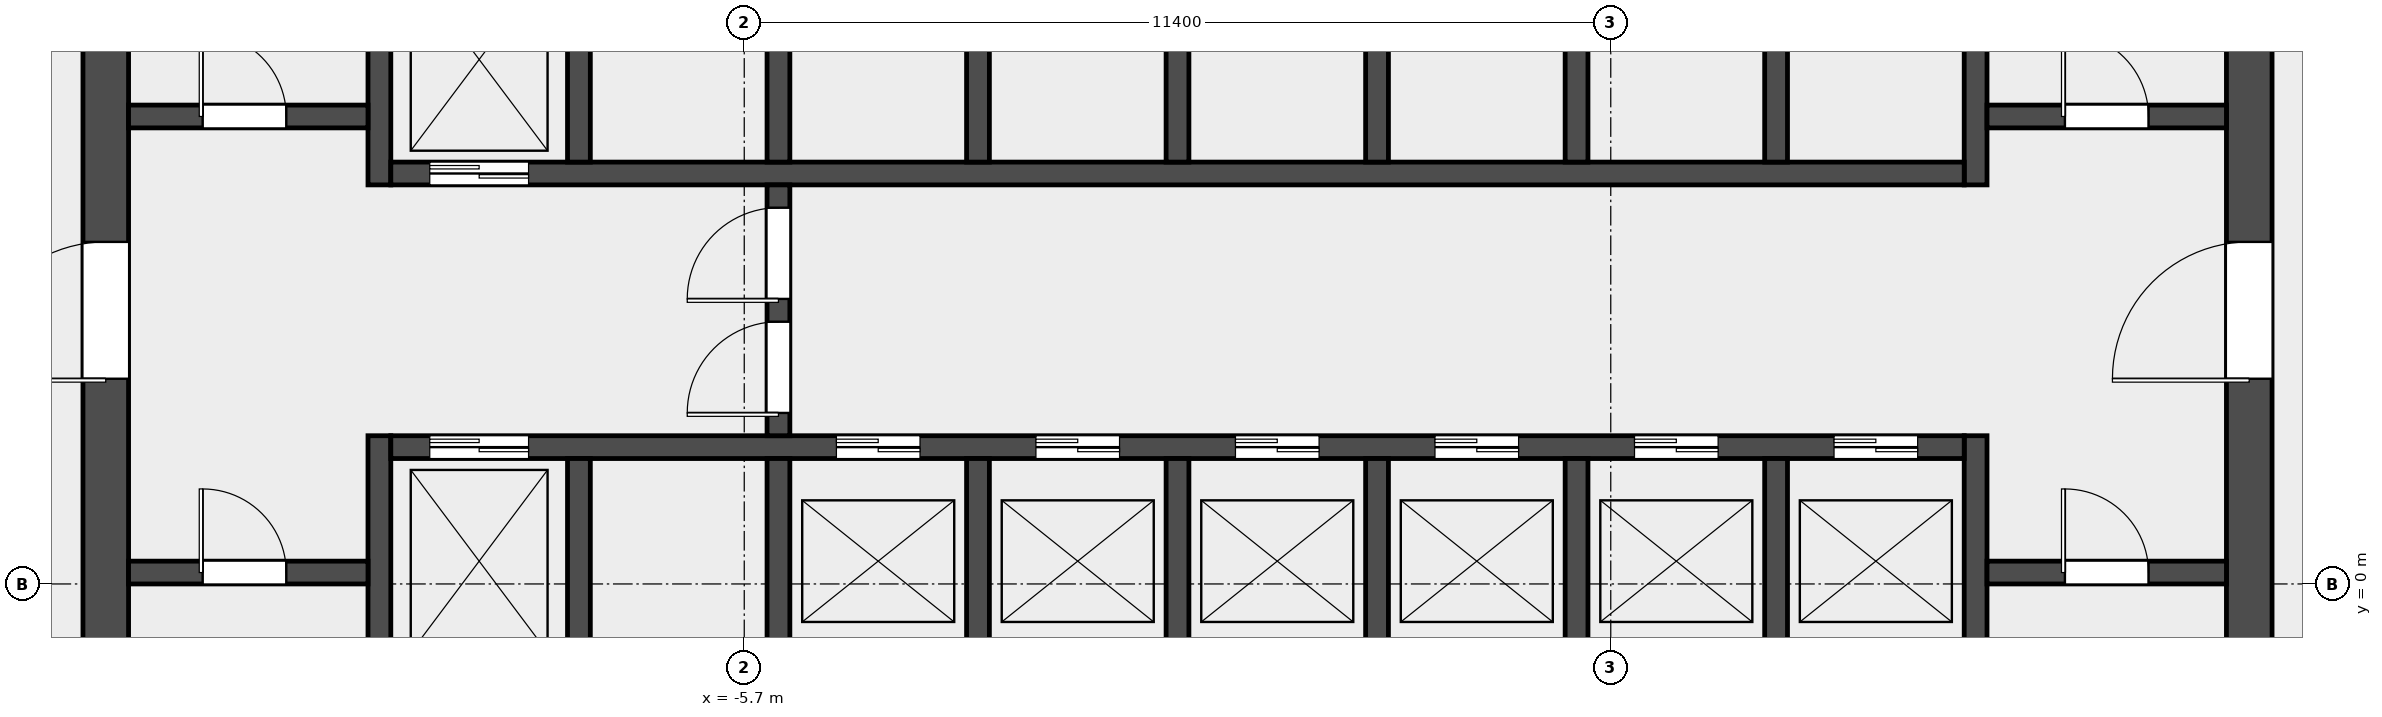
"""IFC4 building model, lengths in metres.
Left out: names, types, materials, properties, quantities, classifications, styles, units other than length and angle.
Written with IfcOpenShell. Run it as: python <this file> out.ifc"""

import sys

from ifc_helpers import new_model, si_unit, direction, frame, frame_2d, origin, place, context, subcontext, project, spatial, rectangle, extrude, element, fill, save


model = new_model("IFC4")
c1 = context("Model", 3, precision=1e-05, world=origin(), true_north=direction((0.0, 1.0)))
c2 = subcontext(c1, "Body", "Model", "MODEL_VIEW")
j1 = project(units=[si_unit("LENGTHUNIT", "METRE"), si_unit("PLANEANGLEUNIT", "RADIAN")], contexts=[c1])
p1 = place(None, origin())
s1 = spatial("IfcSite", under=j1, at=p1, CompositionType="ELEMENT")
p2 = place(p1, origin())
s2 = spatial("IfcBuilding", under=s1, at=p2, CompositionType="ELEMENT")
p3 = place(p2, frame((0.0, 0.0, 165.0)))
s3 = spatial("IfcBuildingStorey", under=s2, at=p3, CompositionType="ELEMENT", Elevation=165.0)
p4 = place(p3, frame((-14.1, -6.6, 0.0), z_axis=(0.0, 0.0, 1.0), x_axis=(0.0, 1.0, 0.0)))
e1 = element("IfcWall", 1, at=p4, inside=s3, PredefinedType="SHEAR", context=c2, shape_type="SweptSolid", body=[
    extrude(rectangle(XDim=19.5, YDim=0.6, at=frame_2d((9.75, 0.0))), origin(), (0.0, 0.0, 1.0), 3.7),
])
p5 = place(p4, frame((9.3, 0.0, 0.0)))
e2 = element("IfcOpeningElement", 2, at=p5, cuts=e1, PredefinedType="OPENING", context=c2, shape_type="SweptSolid", body=[
    extrude(rectangle(XDim=1.8, YDim=2.1, at=frame_2d((0.9, 1.05))), frame((0.0, 0.312, 0.0), z_axis=(0.0, -1.0, 0.0), x_axis=(1.0, 0.0, 0.0)), (0.0, 0.0, 1.0), 0.624),
])
p6 = place(p3, frame((14.1, -6.6, 0.0), z_axis=(0.0, 0.0, 1.0), x_axis=(0.0, 1.0, 0.0)))
e3 = element("IfcWall", 3, at=p6, inside=s3, PredefinedType="SHEAR", context=c2, shape_type="SweptSolid", body=[
    extrude(rectangle(XDim=19.5, YDim=0.6, at=frame_2d((9.75, 0.0))), origin(), (0.0, 0.0, 1.0), 3.7),
])
p7 = place(p6, frame((9.3, 0.0, 0.0)))
e4 = element("IfcOpeningElement", 4, at=p7, cuts=e3, PredefinedType="OPENING", context=c2, shape_type="SweptSolid", body=[
    extrude(rectangle(XDim=1.8, YDim=2.1, at=frame_2d((0.9, 1.05))), frame((0.0, 0.312, 0.0), z_axis=(0.0, -1.0, 0.0), x_axis=(1.0, 0.0, 0.0)), (0.0, 0.0, 1.0), 0.624),
])
p8 = place(p3, frame((-10.5, -6.6, 0.0), z_axis=(0.0, 0.0, 1.0), x_axis=(0.0, 1.0, 0.0)))
e5 = element("IfcWall", 5, at=p8, inside=s3, PredefinedType="SHEAR", context=c2, shape_type="SweptSolid", body=[
    extrude(rectangle(XDim=8.55, YDim=0.3, at=frame_2d((4.275, 0.0))), origin(), (0.0, 0.0, 1.0), 3.7),
])
p9 = place(p3, frame((-10.5, 5.25, 0.0), z_axis=(0.0, 0.0, 1.0), x_axis=(0.0, 1.0, 0.0)))
e6 = element("IfcWall", 6, at=p9, inside=s3, PredefinedType="SHEAR", context=c2, shape_type="SweptSolid", body=[
    extrude(rectangle(XDim=7.65, YDim=0.3, at=frame_2d((3.825, 0.0))), origin(), (0.0, 0.0, 1.0), 3.7),
])
p10 = place(p3, frame((10.5, -6.6, 0.0), z_axis=(0.0, 0.0, 1.0), x_axis=(0.0, 1.0, 0.0)))
e7 = element("IfcWall", 7, at=p10, inside=s3, PredefinedType="SHEAR", context=c2, shape_type="SweptSolid", body=[
    extrude(rectangle(XDim=8.55, YDim=0.3, at=frame_2d((4.275, 0.0))), origin(), (0.0, 0.0, 1.0), 3.7),
])
p11 = place(p3, frame((10.5, 5.25, 0.0), z_axis=(0.0, 0.0, 1.0), x_axis=(0.0, 1.0, 0.0)))
e8 = element("IfcWall", 8, at=p11, inside=s3, PredefinedType="SHEAR", context=c2, shape_type="SweptSolid", body=[
    extrude(rectangle(XDim=7.65, YDim=0.3, at=frame_2d((3.825, 0.0))), origin(), (0.0, 0.0, 1.0), 3.7),
])
p12 = place(p3, frame((-13.8, 0.15, 0.0), z_axis=(0.0, 0.0, 1.0), x_axis=(1.0, 0.0, 0.0)))
e9 = element("IfcWall", 9, at=p12, inside=s3, PredefinedType="SOLIDWALL", context=c2, shape_type="SweptSolid", body=[
    extrude(rectangle(XDim=3.15, YDim=0.3, at=frame_2d((1.575, 0.0))), origin(), (0.0, 0.0, 1.0), 3.7),
])
p13 = place(p12, frame((0.975, 0.0, 0.0)))
e10 = element("IfcOpeningElement", 10, at=p13, cuts=e9, PredefinedType="OPENING", context=c2, shape_type="SweptSolid", body=[
    extrude(rectangle(XDim=1.1, YDim=2.1, at=frame_2d((0.55, 1.05))), frame((0.0, 0.162, 0.0), z_axis=(0.0, -1.0, 0.0), x_axis=(1.0, 0.0, 0.0)), (0.0, 0.0, 1.0), 0.324),
])
p14 = place(p3, frame((-13.8, 6.15, 0.0), z_axis=(0.0, 0.0, 1.0), x_axis=(1.0, 0.0, 0.0)))
e11 = element("IfcWall", 11, at=p14, inside=s3, PredefinedType="SOLIDWALL", context=c2, shape_type="SweptSolid", body=[
    extrude(rectangle(XDim=3.15, YDim=0.3, at=frame_2d((1.575, 0.0))), origin(), (0.0, 0.0, 1.0), 3.7),
])
p15 = place(p14, frame((0.975, 0.0, 0.0)))
e12 = element("IfcOpeningElement", 12, at=p15, cuts=e11, PredefinedType="OPENING", context=c2, shape_type="SweptSolid", body=[
    extrude(rectangle(XDim=1.1, YDim=2.1, at=frame_2d((0.55, 1.05))), frame((0.0, 0.162, 0.0), z_axis=(0.0, -1.0, 0.0), x_axis=(1.0, 0.0, 0.0)), (0.0, 0.0, 1.0), 0.324),
])
p16 = place(p3, frame((10.65, 0.15, 0.0), z_axis=(0.0, 0.0, 1.0), x_axis=(1.0, 0.0, 0.0)))
e13 = element("IfcWall", 13, at=p16, inside=s3, PredefinedType="SOLIDWALL", context=c2, shape_type="SweptSolid", body=[
    extrude(rectangle(XDim=3.15, YDim=0.3, at=frame_2d((1.575, 0.0))), origin(), (0.0, 0.0, 1.0), 3.7),
])
p17 = place(p16, frame((1.025, 0.0, 0.0)))
e14 = element("IfcOpeningElement", 14, at=p17, cuts=e13, PredefinedType="OPENING", context=c2, shape_type="SweptSolid", body=[
    extrude(rectangle(XDim=1.1, YDim=2.1, at=frame_2d((0.55, 1.05))), frame((0.0, 0.162, 0.0), z_axis=(0.0, -1.0, 0.0), x_axis=(1.0, 0.0, 0.0)), (0.0, 0.0, 1.0), 0.324),
])
p18 = place(p3, frame((10.65, 6.15, 0.0), z_axis=(0.0, 0.0, 1.0), x_axis=(1.0, 0.0, 0.0)))
e15 = element("IfcWall", 15, at=p18, inside=s3, PredefinedType="SOLIDWALL", context=c2, shape_type="SweptSolid", body=[
    extrude(rectangle(XDim=3.15, YDim=0.3, at=frame_2d((1.575, 0.0))), origin(), (0.0, 0.0, 1.0), 3.7),
])
p19 = place(p18, frame((1.025, 0.0, 0.0)))
e16 = element("IfcOpeningElement", 16, at=p19, cuts=e15, PredefinedType="OPENING", context=c2, shape_type="SweptSolid", body=[
    extrude(rectangle(XDim=1.1, YDim=2.1, at=frame_2d((0.55, 1.05))), frame((0.0, 0.162, 0.0), z_axis=(0.0, -1.0, 0.0), x_axis=(1.0, 0.0, 0.0)), (0.0, 0.0, 1.0), 0.324),
])
p20 = place(p3, frame((-10.35, 1.8, 0.0), z_axis=(0.0, 0.0, 1.0), x_axis=(1.0, 0.0, 0.0)))
e17 = element("IfcWall", 17, at=p20, inside=s3, PredefinedType="SOLIDWALL", context=c2, shape_type="SweptSolid", body=[
    extrude(rectangle(XDim=20.7, YDim=0.3, at=frame_2d((10.35, 0.0))), origin(), (0.0, 0.0, 1.0), 3.7),
])
p21 = place(p20, frame((0.512, 0.0, 0.0)))
e18 = element("IfcOpeningElement", 18, at=p21, cuts=e17, PredefinedType="OPENING", context=c2, shape_type="SweptSolid", body=[
    extrude(rectangle(XDim=1.3, YDim=2.1, at=frame_2d((0.65, 1.05))), frame((0.0, 0.162, 0.0), z_axis=(0.0, -1.0, 0.0), x_axis=(1.0, 0.0, 0.0)), (0.0, 0.0, 1.0), 0.324),
])
p22 = place(p20, frame((5.863, 0.0, 0.0)))
e19 = element("IfcOpeningElement", 19, at=p22, cuts=e17, PredefinedType="OPENING", context=c2, shape_type="SweptSolid", body=[
    extrude(rectangle(XDim=1.1, YDim=2.1, at=frame_2d((0.55, 1.05))), frame((0.0, 0.162, 0.0), z_axis=(0.0, -1.0, 0.0), x_axis=(1.0, 0.0, 0.0)), (0.0, 0.0, 1.0), 0.324),
])
p23 = place(p20, frame((8.488, 0.0, 0.0)))
e20 = element("IfcOpeningElement", 20, at=p23, cuts=e17, PredefinedType="OPENING", context=c2, shape_type="SweptSolid", body=[
    extrude(rectangle(XDim=1.1, YDim=2.1, at=frame_2d((0.55, 1.05))), frame((0.0, 0.162, 0.0), z_axis=(0.0, -1.0, 0.0), x_axis=(1.0, 0.0, 0.0)), (0.0, 0.0, 1.0), 0.324),
])
p24 = place(p20, frame((11.113, 0.0, 0.0)))
e21 = element("IfcOpeningElement", 21, at=p24, cuts=e17, PredefinedType="OPENING", context=c2, shape_type="SweptSolid", body=[
    extrude(rectangle(XDim=1.1, YDim=2.1, at=frame_2d((0.55, 1.05))), frame((0.0, 0.162, 0.0), z_axis=(0.0, -1.0, 0.0), x_axis=(1.0, 0.0, 0.0)), (0.0, 0.0, 1.0), 0.324),
])
p25 = place(p20, frame((13.738, 0.0, 0.0)))
e22 = element("IfcOpeningElement", 22, at=p25, cuts=e17, PredefinedType="OPENING", context=c2, shape_type="SweptSolid", body=[
    extrude(rectangle(XDim=1.1, YDim=2.1, at=frame_2d((0.55, 1.05))), frame((0.0, 0.162, 0.0), z_axis=(0.0, -1.0, 0.0), x_axis=(1.0, 0.0, 0.0)), (0.0, 0.0, 1.0), 0.324),
])
p26 = place(p20, frame((16.363, 0.0, 0.0)))
e23 = element("IfcOpeningElement", 23, at=p26, cuts=e17, PredefinedType="OPENING", context=c2, shape_type="SweptSolid", body=[
    extrude(rectangle(XDim=1.1, YDim=2.1, at=frame_2d((0.55, 1.05))), frame((0.0, 0.162, 0.0), z_axis=(0.0, -1.0, 0.0), x_axis=(1.0, 0.0, 0.0)), (0.0, 0.0, 1.0), 0.324),
])
p27 = place(p20, frame((18.988, 0.0, 0.0)))
e24 = element("IfcOpeningElement", 24, at=p27, cuts=e17, PredefinedType="OPENING", context=c2, shape_type="SweptSolid", body=[
    extrude(rectangle(XDim=1.1, YDim=2.1, at=frame_2d((0.55, 1.05))), frame((0.0, 0.162, 0.0), z_axis=(0.0, -1.0, 0.0), x_axis=(1.0, 0.0, 0.0)), (0.0, 0.0, 1.0), 0.324),
])
p28 = place(p3, frame((-10.35, 5.4, 0.0), z_axis=(0.0, 0.0, 1.0), x_axis=(1.0, 0.0, 0.0)))
e25 = element("IfcWall", 25, at=p28, inside=s3, PredefinedType="SOLIDWALL", context=c2, shape_type="SweptSolid", body=[
    extrude(rectangle(XDim=20.7, YDim=0.3, at=frame_2d((10.35, 0.0))), origin(), (0.0, 0.0, 1.0), 3.7),
])
p29 = place(p28, frame((0.512, 0.0, 0.0)))
e26 = element("IfcOpeningElement", 26, at=p29, cuts=e25, PredefinedType="OPENING", context=c2, shape_type="SweptSolid", body=[
    extrude(rectangle(XDim=1.3, YDim=2.1, at=frame_2d((0.65, 1.05))), frame((0.0, 0.162, 0.0), z_axis=(0.0, -1.0, 0.0), x_axis=(1.0, 0.0, 0.0)), (0.0, 0.0, 1.0), 0.324),
])
for number, where, z_axis, x_axis in (
    (27, (-7.875, -1.05, 0.0), (0.0, 0.0, 1.0), (0.0, 1.0, 0.0)),
    (28, (-5.25, -1.05, 0.0), (0.0, 0.0, 1.0), (0.0, 1.0, 0.0)),
    (29, (-2.625, -1.05, 0.0), (0.0, 0.0, 1.0), (0.0, 1.0, 0.0)),
    (30, (0.0, -1.05, 0.0), (0.0, 0.0, 1.0), (0.0, 1.0, 0.0)),
    (31, (2.625, -1.05, 0.0), (0.0, 0.0, 1.0), (0.0, 1.0, 0.0)),
    (32, (5.25, -1.05, 0.0), (0.0, 0.0, 1.0), (0.0, 1.0, 0.0)),
    (33, (7.875, -1.05, 0.0), (0.0, 0.0, 1.0), (0.0, 1.0, 0.0)),
    (34, (-7.875, 5.55, 0.0), (0.0, 0.0, 1.0), (0.0, 1.0, 0.0)),
    (35, (-5.25, 5.55, 0.0), (0.0, 0.0, 1.0), (0.0, 1.0, 0.0)),
    (36, (-2.625, 5.55, 0.0), (0.0, 0.0, 1.0), (0.0, 1.0, 0.0)),
    (37, (0.0, 5.55, 0.0), (0.0, 0.0, 1.0), (0.0, 1.0, 0.0)),
    (38, (2.625, 5.55, 0.0), (0.0, 0.0, 1.0), (0.0, 1.0, 0.0)),
    (39, (5.25, 5.55, 0.0), (0.0, 0.0, 1.0), (0.0, 1.0, 0.0)),
    (40, (7.875, 5.55, 0.0), (0.0, 0.0, 1.0), (0.0, 1.0, 0.0)),
):
    element("IfcWall", number, at=place(p3, frame(where, z_axis=z_axis, x_axis=x_axis)), inside=s3, PredefinedType="SOLIDWALL", context=c2, shape_type="SweptSolid", body=[
        extrude(rectangle(XDim=2.7, YDim=0.3, at=frame_2d((1.35, 0.0))), origin(), (0.0, 0.0, 1.0), 3.7),
    ])
p30 = place(p3, frame((-5.25, 1.95, 0.0), z_axis=(0.0, 0.0, 1.0), x_axis=(0.0, 1.0, 0.0)))
e41 = element("IfcWall", 41, at=p30, inside=s3, PredefinedType="SOLIDWALL", context=c2, shape_type="SweptSolid", body=[
    extrude(rectangle(XDim=3.3, YDim=0.3, at=frame_2d((1.65, 0.0))), origin(), (0.0, 0.0, 1.0), 3.7),
])
p31 = place(p30, frame((0.3, 0.0, 0.0)))
e42 = element("IfcOpeningElement", 42, at=p31, cuts=e41, PredefinedType="OPENING", context=c2, shape_type="SweptSolid", body=[
    extrude(rectangle(XDim=1.2, YDim=2.1, at=frame_2d((0.6, 1.05))), frame((0.0, 0.162, 0.0), z_axis=(0.0, -1.0, 0.0), x_axis=(1.0, 0.0, 0.0)), (0.0, 0.0, 1.0), 0.324),
])
p32 = place(p30, frame((1.8, 0.0, 0.0)))
e43 = element("IfcOpeningElement", 43, at=p32, cuts=e41, PredefinedType="OPENING", context=c2, shape_type="SweptSolid", body=[
    extrude(rectangle(XDim=1.2, YDim=2.1, at=frame_2d((0.6, 1.05))), frame((0.0, 0.162, 0.0), z_axis=(0.0, -1.0, 0.0), x_axis=(1.0, 0.0, 0.0)), (0.0, 0.0, 1.0), 0.324),
])
p33 = place(p13, origin())
e44 = element("IfcDoor", 44, at=p33, inside=s3, OperationType="SINGLE_SWING_LEFT", PredefinedType="DOOR", context=c2, shape_type="SweptSolid", body=[
    extrude(rectangle(XDim=1.1, YDim=2.1, at=frame_2d((0.55, 1.05))), frame((0.0, 0.025, 0.0), z_axis=(0.0, -1.0, 0.0), x_axis=(1.0, 0.0, 0.0)), (0.0, 0.0, 1.0), 0.05),
])
fill(e10, e44)
p34 = place(p15, origin())
e45 = element("IfcDoor", 45, at=p34, inside=s3, OperationType="SINGLE_SWING_LEFT", PredefinedType="DOOR", context=c2, shape_type="SweptSolid", body=[
    extrude(rectangle(XDim=1.1, YDim=2.1, at=frame_2d((0.55, 1.05))), frame((0.0, 0.025, 0.0), z_axis=(0.0, -1.0, 0.0), x_axis=(1.0, 0.0, 0.0)), (0.0, 0.0, 1.0), 0.05),
])
fill(e12, e45)
p35 = place(p17, origin())
e46 = element("IfcDoor", 46, at=p35, inside=s3, OperationType="SINGLE_SWING_RIGHT", PredefinedType="DOOR", context=c2, shape_type="SweptSolid", body=[
    extrude(rectangle(XDim=1.1, YDim=2.1, at=frame_2d((0.55, 1.05))), frame((0.0, 0.025, 0.0), z_axis=(0.0, -1.0, 0.0), x_axis=(1.0, 0.0, 0.0)), (0.0, 0.0, 1.0), 0.05),
])
fill(e14, e46)
p36 = place(p19, origin())
e47 = element("IfcDoor", 47, at=p36, inside=s3, OperationType="SINGLE_SWING_RIGHT", PredefinedType="DOOR", context=c2, shape_type="SweptSolid", body=[
    extrude(rectangle(XDim=1.1, YDim=2.1, at=frame_2d((0.55, 1.05))), frame((0.0, 0.025, 0.0), z_axis=(0.0, -1.0, 0.0), x_axis=(1.0, 0.0, 0.0)), (0.0, 0.0, 1.0), 0.05),
])
fill(e16, e47)
p37 = place(p5, origin())
e48 = element("IfcDoor", 48, at=p37, inside=s3, OperationType="DOUBLE_DOOR_SINGLE_SWING", PredefinedType="DOOR", context=c2, shape_type="SweptSolid", body=[
    extrude(rectangle(XDim=1.8, YDim=2.1, at=frame_2d((0.9, 1.05))), frame((0.0, 0.025, 0.0), z_axis=(0.0, -1.0, 0.0), x_axis=(1.0, 0.0, 0.0)), (0.0, 0.0, 1.0), 0.05),
])
fill(e2, e48)
p38 = place(p7, origin())
e49 = element("IfcDoor", 49, at=p38, inside=s3, OperationType="DOUBLE_DOOR_SINGLE_SWING", PredefinedType="DOOR", context=c2, shape_type="SweptSolid", body=[
    extrude(rectangle(XDim=1.8, YDim=2.1, at=frame_2d((0.9, 1.05))), frame((0.0, 0.025, 0.0), z_axis=(0.0, -1.0, 0.0), x_axis=(1.0, 0.0, 0.0)), (0.0, 0.0, 1.0), 0.05),
])
fill(e4, e49)
p39 = place(p31, origin())
e50 = element("IfcDoor", 50, at=p39, inside=s3, OperationType="SINGLE_SWING_LEFT", PredefinedType="DOOR", context=c2, shape_type="SweptSolid", body=[
    extrude(rectangle(XDim=1.2, YDim=2.1, at=frame_2d((0.6, 1.05))), frame((0.0, 0.025, 0.0), z_axis=(0.0, -1.0, 0.0), x_axis=(1.0, 0.0, 0.0)), (0.0, 0.0, 1.0), 0.05),
])
fill(e42, e50)
p40 = place(p32, origin())
e51 = element("IfcDoor", 51, at=p40, inside=s3, OperationType="SINGLE_SWING_RIGHT", PredefinedType="DOOR", context=c2, shape_type="SweptSolid", body=[
    extrude(rectangle(XDim=1.2, YDim=2.1, at=frame_2d((0.6, 1.05))), frame((0.0, 0.025, 0.0), z_axis=(0.0, -1.0, 0.0), x_axis=(1.0, 0.0, 0.0)), (0.0, 0.0, 1.0), 0.05),
])
fill(e43, e51)
p41 = place(p21, origin())
e52 = element("IfcDoor", 52, at=p41, inside=s3, OperationType="DOUBLE_DOOR_SLIDING", PredefinedType="DOOR", context=c2, shape_type="SweptSolid", body=[
    extrude(rectangle(XDim=1.3, YDim=2.1, at=frame_2d((0.65, 1.05))), frame((0.0, 0.025, 0.0), z_axis=(0.0, -1.0, 0.0), x_axis=(1.0, 0.0, 0.0)), (0.0, 0.0, 1.0), 0.05),
])
fill(e18, e52)
p42 = place(p22, origin())
e53 = element("IfcDoor", 53, at=p42, inside=s3, OperationType="DOUBLE_DOOR_SLIDING", PredefinedType="DOOR", context=c2, shape_type="SweptSolid", body=[
    extrude(rectangle(XDim=1.1, YDim=2.1, at=frame_2d((0.55, 1.05))), frame((0.0, 0.025, 0.0), z_axis=(0.0, -1.0, 0.0), x_axis=(1.0, 0.0, 0.0)), (0.0, 0.0, 1.0), 0.05),
])
fill(e19, e53)
p43 = place(p23, origin())
e54 = element("IfcDoor", 54, at=p43, inside=s3, OperationType="DOUBLE_DOOR_SLIDING", PredefinedType="DOOR", context=c2, shape_type="SweptSolid", body=[
    extrude(rectangle(XDim=1.1, YDim=2.1, at=frame_2d((0.55, 1.05))), frame((0.0, 0.025, 0.0), z_axis=(0.0, -1.0, 0.0), x_axis=(1.0, 0.0, 0.0)), (0.0, 0.0, 1.0), 0.05),
])
fill(e20, e54)
p44 = place(p24, origin())
e55 = element("IfcDoor", 55, at=p44, inside=s3, OperationType="DOUBLE_DOOR_SLIDING", PredefinedType="DOOR", context=c2, shape_type="SweptSolid", body=[
    extrude(rectangle(XDim=1.1, YDim=2.1, at=frame_2d((0.55, 1.05))), frame((0.0, 0.025, 0.0), z_axis=(0.0, -1.0, 0.0), x_axis=(1.0, 0.0, 0.0)), (0.0, 0.0, 1.0), 0.05),
])
fill(e21, e55)
p45 = place(p25, origin())
e56 = element("IfcDoor", 56, at=p45, inside=s3, OperationType="DOUBLE_DOOR_SLIDING", PredefinedType="DOOR", context=c2, shape_type="SweptSolid", body=[
    extrude(rectangle(XDim=1.1, YDim=2.1, at=frame_2d((0.55, 1.05))), frame((0.0, 0.025, 0.0), z_axis=(0.0, -1.0, 0.0), x_axis=(1.0, 0.0, 0.0)), (0.0, 0.0, 1.0), 0.05),
])
fill(e22, e56)
p46 = place(p26, origin())
e57 = element("IfcDoor", 57, at=p46, inside=s3, OperationType="DOUBLE_DOOR_SLIDING", PredefinedType="DOOR", context=c2, shape_type="SweptSolid", body=[
    extrude(rectangle(XDim=1.1, YDim=2.1, at=frame_2d((0.55, 1.05))), frame((0.0, 0.025, 0.0), z_axis=(0.0, -1.0, 0.0), x_axis=(1.0, 0.0, 0.0)), (0.0, 0.0, 1.0), 0.05),
])
fill(e23, e57)
p47 = place(p27, origin())
e58 = element("IfcDoor", 58, at=p47, inside=s3, OperationType="DOUBLE_DOOR_SLIDING", PredefinedType="DOOR", context=c2, shape_type="SweptSolid", body=[
    extrude(rectangle(XDim=1.1, YDim=2.1, at=frame_2d((0.55, 1.05))), frame((0.0, 0.025, 0.0), z_axis=(0.0, -1.0, 0.0), x_axis=(1.0, 0.0, 0.0)), (0.0, 0.0, 1.0), 0.05),
])
fill(e24, e58)
p48 = place(p29, origin())
e59 = element("IfcDoor", 59, at=p48, inside=s3, OperationType="DOUBLE_DOOR_SLIDING", PredefinedType="DOOR", context=c2, shape_type="SweptSolid", body=[
    extrude(rectangle(XDim=1.3, YDim=2.1, at=frame_2d((0.65, 1.05))), frame((0.0, 0.025, 0.0), z_axis=(0.0, -1.0, 0.0), x_axis=(1.0, 0.0, 0.0)), (0.0, 0.0, 1.0), 0.05),
])
fill(e26, e59)
save(model, sys.argv[1])
